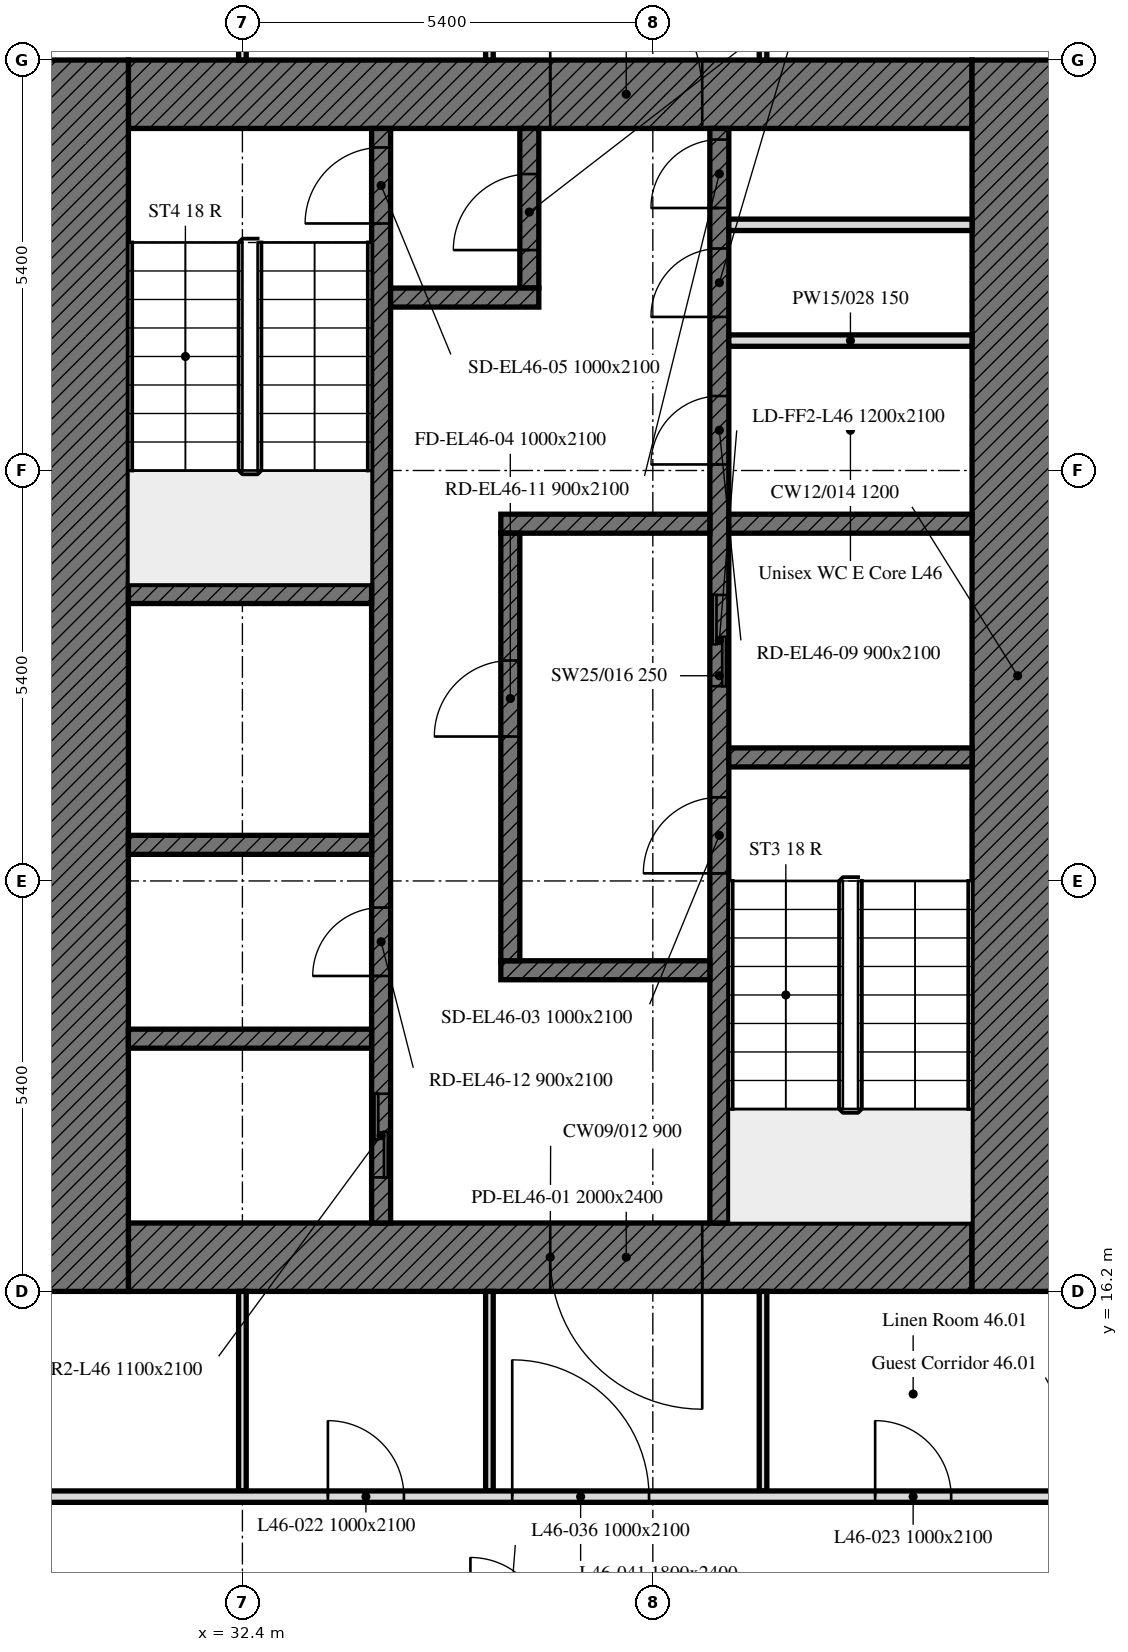
"""IFC4 building model, lengths in metres.
Left out: names, types, materials, properties, quantities, classifications, styles, units other than length and angle.
Written with IfcOpenShell. Run it as: python <this file> out.ifc"""

import sys

from ifc_helpers import new_model, si_unit, direction, frame, frame_2d, origin, place, context, subcontext, project, spatial, rectangle, extrude, element, fill, save


model = new_model("IFC4")
c1 = context("Model", 3, precision=1e-05, world=origin(), true_north=direction((0.0, 1.0)))
c2 = subcontext(c1, "Body", "Model", "MODEL_VIEW")
j1 = project(units=[si_unit("LENGTHUNIT", "METRE"), si_unit("PLANEANGLEUNIT", "RADIAN")], contexts=[c1])
p1 = place(None, origin())
s1 = spatial("IfcSite", under=j1, at=p1, CompositionType="ELEMENT")
p2 = place(p1, origin())
s2 = spatial("IfcBuilding", under=s1, at=p2, CompositionType="ELEMENT")
p3 = place(p2, frame((0.0, 0.0, 190.6)))
s3 = spatial("IfcBuildingStorey", under=s2, at=p3, CompositionType="ELEMENT", Elevation=190.6)
p4 = place(p3, frame((42.0, 16.65, 0.0), z_axis=(0.0, 0.0, 1.0), x_axis=(-1.0, 0.0, 0.0)))
e1 = element("IfcWall", 1, at=p4, inside=s3, PredefinedType="SOLIDWALL", context=c2, shape_type="SweptSolid", body=[
    extrude(rectangle(XDim=11.1, YDim=0.9, at=frame_2d((5.55, 0.0))), origin(), (0.0, 0.0, 1.0), 3.0),
])
p5 = place(p4, frame((3.55, 0.0, 0.0)))
e2 = element("IfcOpeningElement", 2, at=p5, cuts=e1, PredefinedType="OPENING", context=c2, shape_type="SweptSolid", body=[
    extrude(rectangle(XDim=2.0, YDim=2.4, at=frame_2d((1.0, 1.2))), frame((0.0, 0.45, 0.0), z_axis=(0.0, -1.0, 0.0), x_axis=(1.0, 0.0, 0.0)), (0.0, 0.0, 1.0), 0.9),
])
p6 = place(p3, frame((30.9, 31.95, 0.0), z_axis=(0.0, 0.0, 1.0), x_axis=(1.0, 0.0, 0.0)))
e3 = element("IfcWall", 3, at=p6, inside=s3, PredefinedType="SOLIDWALL", context=c2, shape_type="SweptSolid", body=[
    extrude(rectangle(XDim=11.1, YDim=0.9, at=frame_2d((5.55, 0.0))), origin(), (0.0, 0.0, 1.0), 3.0),
])
p7 = place(p6, frame((5.55, 0.0, 0.0)))
e4 = element("IfcOpeningElement", 4, at=p7, cuts=e3, PredefinedType="OPENING", context=c2, shape_type="SweptSolid", body=[
    extrude(rectangle(XDim=2.0, YDim=2.4, at=frame_2d((1.0, 1.2))), frame((0.0, 0.45, 0.0), z_axis=(0.0, -1.0, 0.0), x_axis=(1.0, 0.0, 0.0)), (0.0, 0.0, 1.0), 0.9),
])
for number, where, z_axis, x_axis in (
    (5, (42.6, 32.4, 0.0), (0.0, 0.0, 1.0), (0.0, -1.0, 0.0)),
    (6, (30.3, 16.2, 0.0), (0.0, 0.0, 1.0), (0.0, 1.0, 0.0)),
):
    element("IfcWall", number, at=place(p3, frame(where, z_axis=z_axis, x_axis=x_axis)), inside=s3, PredefinedType="SOLIDWALL", context=c2, shape_type="SweptSolid", body=[
        extrude(rectangle(XDim=16.2, YDim=1.2, at=frame_2d((8.1, 0.0))), origin(), (0.0, 0.0, 1.0), 3.0),
    ])
p8 = place(p3, frame((38.675, 17.1, 0.0), z_axis=(0.0, 0.0, 1.0), x_axis=(0.0, 1.0, 0.0)))
e7 = element("IfcWall", 7, at=p8, inside=s3, PredefinedType="SOLIDWALL", context=c2, shape_type="SweptSolid", body=[
    extrude(rectangle(XDim=14.4, YDim=0.25, at=frame_2d((7.2, 0.0))), origin(), (0.0, 0.0, 1.0), 3.0),
])
p9 = place(p8, frame((4.6, 0.0, 0.0)))
e8 = element("IfcOpeningElement", 8, at=p9, cuts=e7, PredefinedType="OPENING", context=c2, shape_type="SweptSolid", body=[
    extrude(rectangle(XDim=1.0, YDim=2.1, at=frame_2d((0.5, 1.05))), frame((0.0, 0.125, 0.0), z_axis=(0.0, -1.0, 0.0), x_axis=(1.0, 0.0, 0.0)), (0.0, 0.0, 1.0), 0.25),
])
p10 = place(p8, frame((7.062, 0.0, 0.0)))
e9 = element("IfcOpeningElement", 9, at=p10, cuts=e7, PredefinedType="OPENING", context=c2, shape_type="SweptSolid", body=[
    extrude(rectangle(XDim=1.2, YDim=2.1, at=frame_2d((0.6, 1.05))), frame((0.0, 0.125, 0.0), z_axis=(0.0, -1.0, 0.0), x_axis=(1.0, 0.0, 0.0)), (0.0, 0.0, 1.0), 0.25),
])
p11 = place(p8, frame((9.979, 0.0, 0.0)))
e10 = element("IfcOpeningElement", 10, at=p11, cuts=e7, PredefinedType="OPENING", context=c2, shape_type="SweptSolid", body=[
    extrude(rectangle(XDim=0.9, YDim=2.1, at=frame_2d((0.45, 1.05))), frame((0.0, 0.125, 0.0), z_axis=(0.0, -1.0, 0.0), x_axis=(1.0, 0.0, 0.0)), (0.0, 0.0, 1.0), 0.25),
])
p12 = place(p8, frame((11.92, 0.0, 0.0)))
e11 = element("IfcOpeningElement", 11, at=p12, cuts=e7, PredefinedType="OPENING", context=c2, shape_type="SweptSolid", body=[
    extrude(rectangle(XDim=0.9, YDim=2.1, at=frame_2d((0.45, 1.05))), frame((0.0, 0.125, 0.0), z_axis=(0.0, -1.0, 0.0), x_axis=(1.0, 0.0, 0.0)), (0.0, 0.0, 1.0), 0.25),
])
p13 = place(p8, frame((13.354, 0.0, 0.0)))
e12 = element("IfcOpeningElement", 12, at=p13, cuts=e7, PredefinedType="OPENING", context=c2, shape_type="SweptSolid", body=[
    extrude(rectangle(XDim=0.9, YDim=2.1, at=frame_2d((0.45, 1.05))), frame((0.0, 0.125, 0.0), z_axis=(0.0, -1.0, 0.0), x_axis=(1.0, 0.0, 0.0)), (0.0, 0.0, 1.0), 0.25),
])
p14 = place(p3, frame((34.225, 17.1, 0.0), z_axis=(0.0, 0.0, 1.0), x_axis=(0.0, 1.0, 0.0)))
e13 = element("IfcWall", 13, at=p14, inside=s3, PredefinedType="SOLIDWALL", context=c2, shape_type="SweptSolid", body=[
    extrude(rectangle(XDim=14.4, YDim=0.25, at=frame_2d((7.2, 0.0))), origin(), (0.0, 0.0, 1.0), 3.0),
])
p15 = place(p14, frame((13.15, 0.0, 0.0)))
e14 = element("IfcOpeningElement", 14, at=p15, cuts=e13, PredefinedType="OPENING", context=c2, shape_type="SweptSolid", body=[
    extrude(rectangle(XDim=1.0, YDim=2.1, at=frame_2d((0.5, 1.05))), frame((0.0, 0.125, 0.0), z_axis=(0.0, -1.0, 0.0), x_axis=(1.0, 0.0, 0.0)), (0.0, 0.0, 1.0), 0.25),
])
p16 = place(p14, frame((0.6, 0.0, 0.0)))
e15 = element("IfcOpeningElement", 15, at=p16, cuts=e13, PredefinedType="OPENING", context=c2, shape_type="SweptSolid", body=[
    extrude(rectangle(XDim=1.1, YDim=2.1, at=frame_2d((0.55, 1.05))), frame((0.0, 0.125, 0.0), z_axis=(0.0, -1.0, 0.0), x_axis=(1.0, 0.0, 0.0)), (0.0, 0.0, 1.0), 0.25),
])
p17 = place(p14, frame((3.25, 0.0, 0.0)))
e16 = element("IfcOpeningElement", 16, at=p17, cuts=e13, PredefinedType="OPENING", context=c2, shape_type="SweptSolid", body=[
    extrude(rectangle(XDim=0.9, YDim=2.1, at=frame_2d((0.45, 1.05))), frame((0.0, 0.125, 0.0), z_axis=(0.0, -1.0, 0.0), x_axis=(1.0, 0.0, 0.0)), (0.0, 0.0, 1.0), 0.25),
])
p18 = place(p3, frame((38.8, 23.225, 0.0), z_axis=(0.0, 0.0, 1.0), x_axis=(1.0, 0.0, 0.0)))
e17 = element("IfcWall", 17, at=p18, inside=s3, PredefinedType="SOLIDWALL", context=c2, shape_type="SweptSolid", body=[
    extrude(rectangle(XDim=3.2, YDim=0.25, at=frame_2d((1.6, 0.0))), origin(), (0.0, 0.0, 1.0), 3.0),
])
for number, where, z_axis, x_axis in (
    (18, (30.9, 25.375, 0.0), (0.0, 0.0, 1.0), (1.0, 0.0, 0.0)),
    (19, (30.9, 22.075, 0.0), (0.0, 0.0, 1.0), (1.0, 0.0, 0.0)),
):
    element("IfcWall", number, at=place(p3, frame(where, z_axis=z_axis, x_axis=x_axis)), inside=s3, PredefinedType="SOLIDWALL", context=c2, shape_type="SweptSolid", body=[
        extrude(rectangle(XDim=3.2, YDim=0.25, at=frame_2d((1.6, 0.0))), origin(), (0.0, 0.0, 1.0), 3.0),
    ])
p19 = place(p3, frame((38.8, 26.3, 0.0), z_axis=(0.0, 0.0, 1.0), x_axis=(1.0, 0.0, 0.0)))
e20 = element("IfcWall", 20, at=p19, inside=s3, PredefinedType="SOLIDWALL", context=c2, shape_type="SweptSolid", body=[
    extrude(rectangle(XDim=3.2, YDim=0.25, at=frame_2d((1.6, 0.0))), origin(), (0.0, 0.0, 1.0), 3.0),
])
for number, where, z_axis, x_axis in (
    (21, (35.8, 26.3, 0.0), (0.0, 0.0, 1.0), (1.0, 0.0, 0.0)),
    (22, (35.8, 20.425, 0.0), (0.0, 0.0, 1.0), (1.0, 0.0, 0.0)),
):
    element("IfcWall", number, at=place(p3, frame(where, z_axis=z_axis, x_axis=x_axis)), inside=s3, PredefinedType="SOLIDWALL", context=c2, shape_type="SweptSolid", body=[
        extrude(rectangle(XDim=2.75, YDim=0.25, at=frame_2d((1.375, 0.0))), origin(), (0.0, 0.0, 1.0), 3.0),
    ])
p20 = place(p3, frame((36.175, 29.4, 0.0), z_axis=(0.0, 0.0, 1.0), x_axis=(0.0, 1.0, 0.0)))
e23 = element("IfcWall", 23, at=p20, inside=s3, PredefinedType="SOLIDWALL", context=c2, shape_type="SweptSolid", body=[
    extrude(rectangle(XDim=2.1, YDim=0.25, at=frame_2d((1.05, 0.0))), origin(), (0.0, 0.0, 1.0), 3.0),
])
p21 = place(p20, frame((0.5, 0.0, 0.0)))
e24 = element("IfcOpeningElement", 24, at=p21, cuts=e23, PredefinedType="OPENING", context=c2, shape_type="SweptSolid", body=[
    extrude(rectangle(XDim=1.0, YDim=2.1, at=frame_2d((0.5, 1.05))), frame((0.0, 0.125, 0.0), z_axis=(0.0, -1.0, 0.0), x_axis=(1.0, 0.0, 0.0)), (0.0, 0.0, 1.0), 0.25),
])
p22 = place(p3, frame((34.35, 29.275, 0.0), z_axis=(0.0, 0.0, 1.0), x_axis=(1.0, 0.0, 0.0)))
e25 = element("IfcWall", 25, at=p22, inside=s3, PredefinedType="SOLIDWALL", context=c2, shape_type="SweptSolid", body=[
    extrude(rectangle(XDim=1.95, YDim=0.25, at=frame_2d((0.975, 0.0))), origin(), (0.0, 0.0, 1.0), 3.0),
])
p23 = place(p3, frame((35.925, 20.55, 0.0), z_axis=(0.0, 0.0, 1.0), x_axis=(0.0, 1.0, 0.0)))
e26 = element("IfcWall", 26, at=p23, inside=s3, PredefinedType="SOLIDWALL", context=c2, shape_type="SweptSolid", body=[
    extrude(rectangle(XDim=5.625, YDim=0.25, at=frame_2d((2.812, 0.0))), origin(), (0.0, 0.0, 1.0), 3.0),
])
p24 = place(p23, frame((2.95, 0.0, 0.0)))
e27 = element("IfcOpeningElement", 27, at=p24, cuts=e26, PredefinedType="OPENING", context=c2, shape_type="SweptSolid", body=[
    extrude(rectangle(XDim=1.0, YDim=2.1, at=frame_2d((0.5, 1.05))), frame((0.0, 0.125, 0.0), z_axis=(0.0, -1.0, 0.0), x_axis=(1.0, 0.0, 0.0)), (0.0, 0.0, 1.0), 0.25),
])
p25 = place(p3, frame((30.9, 19.525, 0.0), z_axis=(0.0, 0.0, 1.0), x_axis=(1.0, 0.0, 0.0)))
e28 = element("IfcWall", 28, at=p25, inside=s3, PredefinedType="SOLIDWALL", context=c2, shape_type="SweptSolid", body=[
    extrude(rectangle(XDim=3.2, YDim=0.25, at=frame_2d((1.6, 0.0))), origin(), (0.0, 0.0, 1.0), 3.0),
])
for number, where, z_axis, x_axis in (
    (29, (38.8, 28.709, 0.0), (0.0, 0.0, 1.0), (1.0, 0.0, 0.0)),
    (30, (38.8, 30.232, 0.0), (0.0, 0.0, 1.0), (1.0, 0.0, 0.0)),
):
    element("IfcWall", number, at=place(p3, frame(where, z_axis=z_axis, x_axis=x_axis)), inside=s3, PredefinedType="PARTITIONING", context=c2, shape_type="SweptSolid", body=[
        extrude(rectangle(XDim=3.2, YDim=0.15, at=frame_2d((1.6, 0.0))), origin(), (0.0, 0.0, 1.0), 3.0),
    ])
p26 = place(p3, frame((32.4, 32.4, 0.0), z_axis=(0.0, 0.0, 1.0), x_axis=(0.0, 1.0, 0.0)))
e31 = element("IfcWall", 31, at=p26, inside=s3, PredefinedType="PARTITIONING", context=c2, shape_type="SweptSolid", body=[
    extrude(rectangle(XDim=4.98, YDim=0.1, at=frame_2d((2.49, 0.0))), origin(), (0.0, 0.0, 1.0), 2.4),
])
for number, where, z_axis, x_axis in (
    (32, (35.65, 39.525, 0.0), (0.0, 0.0, 1.0), (0.0, -1.0, 0.0)),
    (33, (39.25, 32.4, 0.0), (0.0, 0.0, 1.0), (0.0, 1.0, 0.0)),
):
    element("IfcWall", number, at=place(p3, frame(where, z_axis=z_axis, x_axis=x_axis)), inside=s3, PredefinedType="PARTITIONING", context=c2, shape_type="SweptSolid", body=[
        extrude(rectangle(XDim=7.125, YDim=0.1, at=frame_2d((3.562, 0.0))), origin(), (0.0, 0.0, 1.0), 2.4),
    ])
for number, where, z_axis, x_axis in (
    (34, (32.4, 13.575, 0.0), (0.0, 0.0, 1.0), (0.0, 1.0, 0.0)),
    (35, (35.65, 16.2, 0.0), (0.0, 0.0, 1.0), (0.0, -1.0, 0.0)),
    (36, (39.25, 13.575, 0.0), (0.0, 0.0, 1.0), (0.0, 1.0, 0.0)),
):
    element("IfcWall", number, at=place(p3, frame(where, z_axis=z_axis, x_axis=x_axis)), inside=s3, PredefinedType="PARTITIONING", context=c2, shape_type="SweptSolid", body=[
        extrude(rectangle(XDim=2.625, YDim=0.1, at=frame_2d((1.312, 0.0))), origin(), (0.0, 0.0, 1.0), 3.0),
    ])
p27 = place(p3, frame((9.45, 13.5, 0.0), z_axis=(0.0, 0.0, 1.0), x_axis=(1.0, 0.0, 0.0)))
e37 = element("IfcWall", 37, at=p27, inside=s3, PredefinedType="PARTITIONING", context=c2, shape_type="SweptSolid", body=[
    extrude(rectangle(XDim=33.675, YDim=0.15, at=frame_2d((16.837, 0.0))), origin(), (0.0, 0.0, 1.0), 3.0),
])
p28 = place(p27, frame((8.95, 0.0, 0.0)))
e38 = element("IfcOpeningElement", 38, at=p28, cuts=e37, PredefinedType="OPENING", context=c2, shape_type="SweptSolid", body=[
    extrude(rectangle(XDim=1.0, YDim=2.1, at=frame_2d((0.5, 1.05))), frame((0.0, 0.075, 0.0), z_axis=(0.0, -1.0, 0.0), x_axis=(1.0, 0.0, 0.0)), (0.0, 0.0, 1.0), 0.15),
])
p29 = place(p27, frame((15.517, 0.0, 0.0)))
e39 = element("IfcOpeningElement", 39, at=p29, cuts=e37, PredefinedType="OPENING", context=c2, shape_type="SweptSolid", body=[
    extrude(rectangle(XDim=1.0, YDim=2.1, at=frame_2d((0.5, 1.05))), frame((0.0, 0.075, 0.0), z_axis=(0.0, -1.0, 0.0), x_axis=(1.0, 0.0, 0.0)), (0.0, 0.0, 1.0), 0.15),
])
p30 = place(p27, frame((24.075, 0.0, 0.0)))
e40 = element("IfcOpeningElement", 40, at=p30, cuts=e37, PredefinedType="OPENING", context=c2, shape_type="SweptSolid", body=[
    extrude(rectangle(XDim=1.0, YDim=2.1, at=frame_2d((0.5, 1.05))), frame((0.0, 0.075, 0.0), z_axis=(0.0, -1.0, 0.0), x_axis=(1.0, 0.0, 0.0)), (0.0, 0.0, 1.0), 0.15),
])
p31 = place(p27, frame((31.275, 0.0, 0.0)))
e41 = element("IfcOpeningElement", 41, at=p31, cuts=e37, PredefinedType="OPENING", context=c2, shape_type="SweptSolid", body=[
    extrude(rectangle(XDim=1.0, YDim=2.1, at=frame_2d((0.5, 1.05))), frame((0.0, 0.075, 0.0), z_axis=(0.0, -1.0, 0.0), x_axis=(1.0, 0.0, 0.0)), (0.0, 0.0, 1.0), 0.15),
])
p32 = place(p27, frame((4.625, 0.0, 0.0)))
e42 = element("IfcOpeningElement", 42, at=p32, cuts=e37, PredefinedType="OPENING", context=c2, shape_type="SweptSolid", body=[
    extrude(rectangle(XDim=1.0, YDim=2.1, at=frame_2d((0.5, 1.05))), frame((0.0, 0.075, 0.0), z_axis=(0.0, -1.0, 0.0), x_axis=(1.0, 0.0, 0.0)), (0.0, 0.0, 1.0), 0.15),
])
p33 = place(p27, frame((1.4, 0.0, 0.0)))
e43 = element("IfcOpeningElement", 43, at=p33, cuts=e37, PredefinedType="OPENING", context=c2, shape_type="SweptSolid", body=[
    extrude(rectangle(XDim=1.8, YDim=2.4, at=frame_2d((0.9, 1.2))), frame((0.0, 0.075, 0.0), z_axis=(0.0, -1.0, 0.0), x_axis=(1.0, 0.0, 0.0)), (0.0, 0.0, 1.0), 0.15),
])
p34 = place(p27, frame((26.5, 0.0, 0.0)))
e44 = element("IfcOpeningElement", 44, at=p34, cuts=e37, PredefinedType="OPENING", context=c2, shape_type="SweptSolid", body=[
    extrude(rectangle(XDim=1.8, YDim=2.4, at=frame_2d((0.9, 1.2))), frame((0.0, 0.075, 0.0), z_axis=(0.0, -1.0, 0.0), x_axis=(1.0, 0.0, 0.0)), (0.0, 0.0, 1.0), 0.15),
])
p35 = place(p5, origin())
e45 = element("IfcDoor", 45, at=p35, inside=s3, OperationType="DOUBLE_DOOR_SINGLE_SWING", PredefinedType="DOOR", context=c2, shape_type="SweptSolid", body=[
    extrude(rectangle(XDim=2.0, YDim=2.4, at=frame_2d((1.0, 1.2))), frame((0.0, 0.025, 0.0), z_axis=(0.0, -1.0, 0.0), x_axis=(1.0, 0.0, 0.0)), (0.0, 0.0, 1.0), 0.05),
])
fill(e2, e45)
p36 = place(p7, origin())
e46 = element("IfcDoor", 46, at=p36, inside=s3, OperationType="DOUBLE_DOOR_SINGLE_SWING", PredefinedType="DOOR", context=c2, shape_type="SweptSolid", body=[
    extrude(rectangle(XDim=2.0, YDim=2.4, at=frame_2d((1.0, 1.2))), frame((0.0, 0.025, 0.0), z_axis=(0.0, -1.0, 0.0), x_axis=(1.0, 0.0, 0.0)), (0.0, 0.0, 1.0), 0.05),
])
fill(e4, e46)
p37 = place(p9, origin())
e47 = element("IfcDoor", 47, at=p37, inside=s3, OperationType="SINGLE_SWING_LEFT", PredefinedType="DOOR", context=c2, shape_type="SweptSolid", body=[
    extrude(rectangle(XDim=1.0, YDim=2.1, at=frame_2d((0.5, 1.05))), frame((0.0, 0.025, 0.0), z_axis=(0.0, -1.0, 0.0), x_axis=(1.0, 0.0, 0.0)), (0.0, 0.0, 1.0), 0.05),
])
fill(e8, e47)
p38 = place(p24, origin())
e48 = element("IfcDoor", 48, at=p38, inside=s3, OperationType="SINGLE_SWING_LEFT", PredefinedType="DOOR", context=c2, shape_type="SweptSolid", body=[
    extrude(rectangle(XDim=1.0, YDim=2.1, at=frame_2d((0.5, 1.05))), frame((0.0, 0.025, 0.0), z_axis=(0.0, -1.0, 0.0), x_axis=(1.0, 0.0, 0.0)), (0.0, 0.0, 1.0), 0.05),
])
fill(e27, e48)
p39 = place(p15, origin())
e49 = element("IfcDoor", 49, at=p39, inside=s3, OperationType="SINGLE_SWING_LEFT", PredefinedType="DOOR", context=c2, shape_type="SweptSolid", body=[
    extrude(rectangle(XDim=1.0, YDim=2.1, at=frame_2d((0.5, 1.05))), frame((0.0, 0.025, 0.0), z_axis=(0.0, -1.0, 0.0), x_axis=(1.0, 0.0, 0.0)), (0.0, 0.0, 1.0), 0.05),
])
fill(e14, e49)
p40 = place(p21, origin())
e50 = element("IfcDoor", 50, at=p40, inside=s3, OperationType="SINGLE_SWING_LEFT", PredefinedType="DOOR", context=c2, shape_type="SweptSolid", body=[
    extrude(rectangle(XDim=1.0, YDim=2.1, at=frame_2d((0.5, 1.05))), frame((0.0, 0.025, 0.0), z_axis=(0.0, -1.0, 0.0), x_axis=(1.0, 0.0, 0.0)), (0.0, 0.0, 1.0), 0.05),
])
fill(e24, e50)
p41 = place(p10, origin())
e51 = element("IfcDoor", 51, at=p41, inside=s3, OperationType="DOUBLE_DOOR_SLIDING", PredefinedType="DOOR", context=c2, shape_type="SweptSolid", body=[
    extrude(rectangle(XDim=1.2, YDim=2.1, at=frame_2d((0.6, 1.05))), frame((0.0, 0.025, 0.0), z_axis=(0.0, -1.0, 0.0), x_axis=(1.0, 0.0, 0.0)), (0.0, 0.0, 1.0), 0.05),
])
fill(e9, e51)
p42 = place(p16, origin())
e52 = element("IfcDoor", 52, at=p42, inside=s3, OperationType="DOUBLE_DOOR_SLIDING", PredefinedType="DOOR", context=c2, shape_type="SweptSolid", body=[
    extrude(rectangle(XDim=1.1, YDim=2.1, at=frame_2d((0.55, 1.05))), frame((0.0, 0.025, 0.0), z_axis=(0.0, -1.0, 0.0), x_axis=(1.0, 0.0, 0.0)), (0.0, 0.0, 1.0), 0.05),
])
fill(e15, e52)
p43 = place(p11, origin())
e53 = element("IfcDoor", 53, at=p43, inside=s3, OperationType="SINGLE_SWING_LEFT", PredefinedType="DOOR", context=c2, shape_type="SweptSolid", body=[
    extrude(rectangle(XDim=0.9, YDim=2.1, at=frame_2d((0.45, 1.05))), frame((0.0, 0.025, 0.0), z_axis=(0.0, -1.0, 0.0), x_axis=(1.0, 0.0, 0.0)), (0.0, 0.0, 1.0), 0.05),
])
fill(e10, e53)
p44 = place(p12, origin())
e54 = element("IfcDoor", 54, at=p44, inside=s3, OperationType="SINGLE_SWING_LEFT", PredefinedType="DOOR", context=c2, shape_type="SweptSolid", body=[
    extrude(rectangle(XDim=0.9, YDim=2.1, at=frame_2d((0.45, 1.05))), frame((0.0, 0.025, 0.0), z_axis=(0.0, -1.0, 0.0), x_axis=(1.0, 0.0, 0.0)), (0.0, 0.0, 1.0), 0.05),
])
fill(e11, e54)
p45 = place(p13, origin())
e55 = element("IfcDoor", 55, at=p45, inside=s3, OperationType="SINGLE_SWING_LEFT", PredefinedType="DOOR", context=c2, shape_type="SweptSolid", body=[
    extrude(rectangle(XDim=0.9, YDim=2.1, at=frame_2d((0.45, 1.05))), frame((0.0, 0.025, 0.0), z_axis=(0.0, -1.0, 0.0), x_axis=(1.0, 0.0, 0.0)), (0.0, 0.0, 1.0), 0.05),
])
fill(e12, e55)
p46 = place(p17, origin())
e56 = element("IfcDoor", 56, at=p46, inside=s3, OperationType="SINGLE_SWING_LEFT", PredefinedType="DOOR", context=c2, shape_type="SweptSolid", body=[
    extrude(rectangle(XDim=0.9, YDim=2.1, at=frame_2d((0.45, 1.05))), frame((0.0, 0.025, 0.0), z_axis=(0.0, -1.0, 0.0), x_axis=(1.0, 0.0, 0.0)), (0.0, 0.0, 1.0), 0.05),
])
fill(e16, e56)
p47 = place(p30, origin())
e57 = element("IfcDoor", 57, at=p47, inside=s3, OperationType="SINGLE_SWING_RIGHT", PredefinedType="DOOR", context=c2, shape_type="SweptSolid", body=[
    extrude(rectangle(XDim=1.0, YDim=2.1, at=frame_2d((0.5, 1.05))), frame((0.0, 0.025, 0.0), z_axis=(0.0, -1.0, 0.0), x_axis=(1.0, 0.0, 0.0)), (0.0, 0.0, 1.0), 0.05),
])
fill(e40, e57)
p48 = place(p31, origin())
e58 = element("IfcDoor", 58, at=p48, inside=s3, OperationType="SINGLE_SWING_LEFT", PredefinedType="DOOR", context=c2, shape_type="SweptSolid", body=[
    extrude(rectangle(XDim=1.0, YDim=2.1, at=frame_2d((0.5, 1.05))), frame((0.0, 0.025, 0.0), z_axis=(0.0, -1.0, 0.0), x_axis=(1.0, 0.0, 0.0)), (0.0, 0.0, 1.0), 0.05),
])
fill(e41, e58)
p49 = place(p34, origin())
e59 = element("IfcDoor", 59, at=p49, inside=s3, OperationType="DOUBLE_DOOR_SINGLE_SWING", PredefinedType="DOOR", context=c2, shape_type="SweptSolid", body=[
    extrude(rectangle(XDim=1.8, YDim=2.4, at=frame_2d((0.9, 1.2))), frame((0.0, 0.025, 0.0), z_axis=(0.0, -1.0, 0.0), x_axis=(1.0, 0.0, 0.0)), (0.0, 0.0, 1.0), 0.05),
])
fill(e44, e59)
save(model, sys.argv[1])
